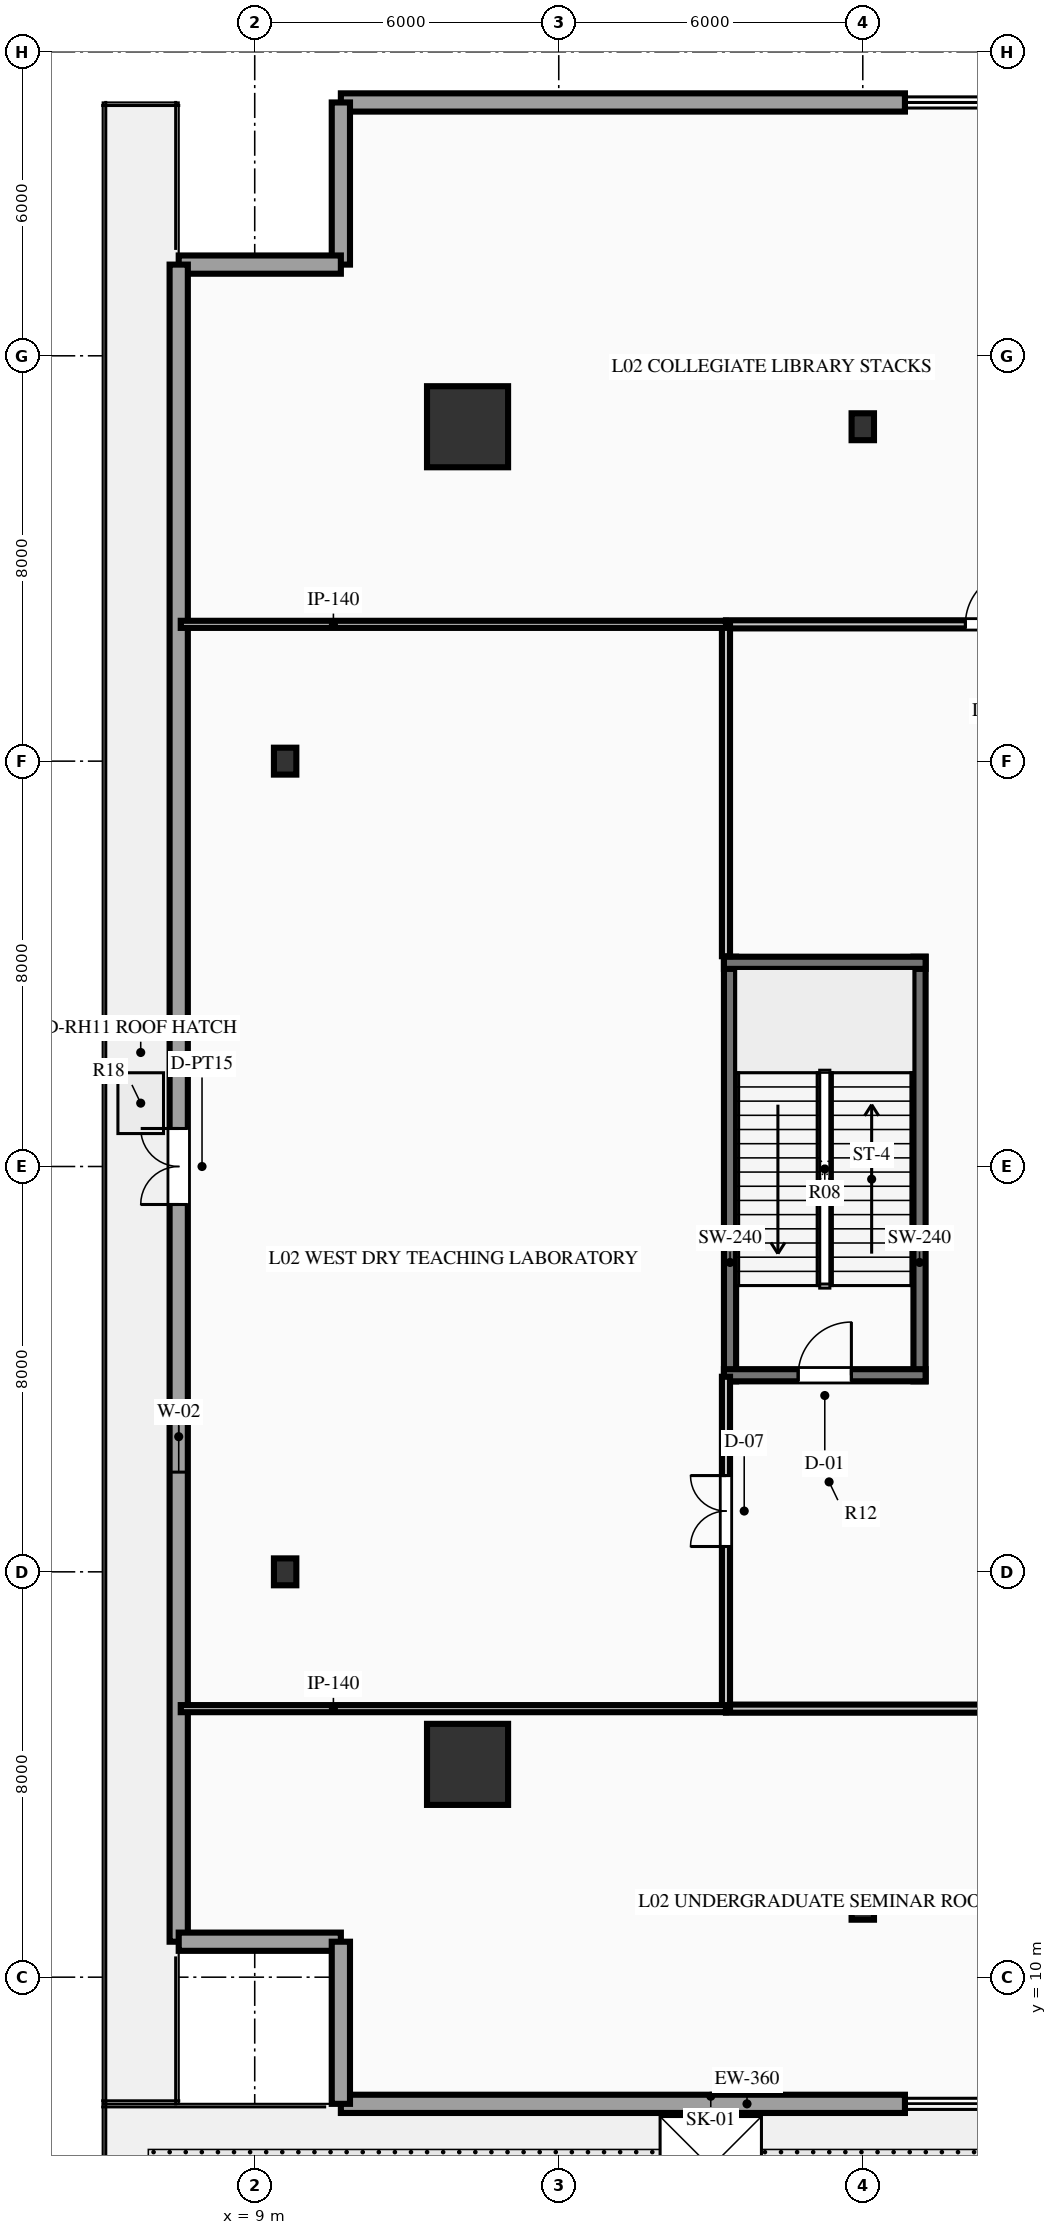
"""IFC4 building model, lengths in metres.
Left out: names, types, materials, properties, quantities, classifications, styles, units other than length and angle.
Written with IfcOpenShell. Run it as: python <this file> out.ifc"""

import sys

from ifc_helpers import new_model, si_unit, direction, frame, frame_2d, origin, origin_2d, place, context, subcontext, project, spatial, rectangle, hollow_rectangle, i_section, extrude, element, fill, save


model = new_model("IFC4")
c1 = context("Model", 3, precision=1e-05, world=origin(), true_north=direction((0.0, 1.0)))
c2 = subcontext(c1, "Body", "Model", "MODEL_VIEW")
j1 = project(units=[si_unit("LENGTHUNIT", "METRE"), si_unit("PLANEANGLEUNIT", "RADIAN")], contexts=[c1])
p1 = place(None, origin())
s1 = spatial("IfcSite", under=j1, at=p1, CompositionType="ELEMENT")
p2 = place(p1, origin())
s2 = spatial("IfcBuilding", under=s1, at=p2, CompositionType="ELEMENT")
p3 = place(p2, frame((0.0, 0.0, 11.4)))
s3 = spatial("IfcBuildingStorey", under=s2, at=p3, CompositionType="ELEMENT", Elevation=11.4)
for number, where, z_axis, x_axis in (
    (1, (18.38, 21.76, 0.0), (0.0, 0.0, 1.0), (0.0, 1.0, 0.0)),
    (2, (22.12, 21.76, 0.0), (0.0, 0.0, 1.0), (0.0, 1.0, 0.0)),
):
    element("IfcWall", number, at=place(p3, frame(where, z_axis=z_axis, x_axis=x_axis)), inside=s3, PredefinedType="SHEAR", context=c2, shape_type="SweptSolid", body=[
        extrude(rectangle(XDim=8.38, YDim=0.24, at=frame_2d((4.19, 0.0))), origin(), (0.0, 0.0, 1.0), 5.4),
    ])
p4 = place(p3, frame((18.26, 21.88, 0.0), z_axis=(0.0, 0.0, 1.0), x_axis=(1.0, 0.0, 0.0)))
e3 = element("IfcWall", 3, at=p4, inside=s3, PredefinedType="SHEAR", context=c2, shape_type="SweptSolid", body=[
    extrude(rectangle(XDim=3.98, YDim=0.24, at=frame_2d((1.99, 0.0))), origin(), (0.0, 0.0, 1.0), 5.4),
])
p5 = place(p4, frame((1.465, 0.0, 0.0)))
e4 = element("IfcOpeningElement", 4, at=p5, cuts=e3, PredefinedType="OPENING", context=c2, shape_type="SweptSolid", body=[
    extrude(rectangle(XDim=1.05, YDim=2.15, at=frame_2d((0.525, 1.075))), frame((0.0, 0.13, 0.0), z_axis=(0.0, -1.0, 0.0), x_axis=(1.0, 0.0, 0.0)), (0.0, 0.0, 1.0), 0.26),
])
p6 = place(p3, frame((18.26, 30.02, 0.0), z_axis=(0.0, 0.0, 1.0), x_axis=(1.0, 0.0, 0.0)))
e5 = element("IfcWall", 5, at=p6, inside=s3, PredefinedType="SHEAR", context=c2, shape_type="SweptSolid", body=[
    extrude(rectangle(XDim=3.98, YDim=0.24, at=frame_2d((1.99, 0.0))), origin(), (0.0, 0.0, 1.0), 5.4),
])
for number, where, z_axis, x_axis in (
    (6, (13.2, 14.2, 0.0), (0.0, 0.0, 1.0), (1.0, 0.0, 0.0)),
    (7, (13.2, 40.6, 0.0), (0.0, 0.0, 1.0), (1.0, 0.0, 0.0)),
):
    element("IfcColumn", number, at=place(p3, frame(where, z_axis=z_axis, x_axis=x_axis)), inside=s3, PredefinedType="COLUMN", context=c2, shape_type="SweptSolid", body=[
        extrude(hollow_rectangle(XDim=1.6, YDim=1.6, WallThickness=0.08, at=origin_2d()), origin(), (0.0, 0.0, 1.0), 5.4),
    ])
for number, where, z_axis, x_axis in (
    (8, (9.6, 18.0, 0.0), (0.0, 0.0, 1.0), (1.0, 0.0, 0.0)),
    (9, (9.6, 34.0, 0.0), (0.0, 0.0, 1.0), (1.0, 0.0, 0.0)),
    (10, (21.0, 11.4, 0.0), (0.0, 0.0, 1.0), (1.0, 0.0, 0.0)),
    (11, (21.0, 40.6, 0.0), (0.0, 0.0, 1.0), (1.0, 0.0, 0.0)),
):
    element("IfcColumn", number, at=place(p3, frame(where, z_axis=z_axis, x_axis=x_axis)), inside=s3, PredefinedType="COLUMN", context=c2, shape_type="SweptSolid", body=[
        extrude(i_section(OverallWidth=0.442, OverallDepth=0.531, WebThickness=0.066, FlangeThickness=0.106, at=origin_2d()), origin(), (0.0, 0.0, 1.0), 5.4),
    ])
for number, where, z_axis, x_axis in (
    (12, (21.832, 7.5, 0.0), (0.0, 0.0, 1.0), (-1.0, 0.0, 0.0)),
    (13, (10.7, 47.0, 0.0), (0.0, 0.0, 1.0), (1.0, 0.0, 0.0)),
):
    element("IfcWall", number, at=place(p3, frame(where, z_axis=z_axis, x_axis=x_axis)), inside=s3, PredefinedType="STANDARD", context=c2, shape_type="SweptSolid", body=[
        extrude(rectangle(XDim=11.132, YDim=0.36, at=frame_2d((5.566, 0.0))), origin(), (0.0, 0.0, 1.0), 5.07),
    ])
for number, where, z_axis, x_axis in (
    (14, (10.7, 43.8, 0.0), (0.0, 0.0, 1.0), (0.0, 1.0, 0.0)),
    (15, (7.5, 43.8, 0.0), (0.0, 0.0, 1.0), (1.0, 0.0, 0.0)),
):
    element("IfcWall", number, at=place(p3, frame(where, z_axis=z_axis, x_axis=x_axis)), inside=s3, PredefinedType="STANDARD", context=c2, shape_type="SweptSolid", body=[
        extrude(rectangle(XDim=3.2, YDim=0.36, at=frame_2d((1.6, 0.0))), origin(), (0.0, 0.0, 1.0), 5.07),
    ])
p7 = place(p3, frame((7.5, 10.7, 0.0), z_axis=(0.0, 0.0, 1.0), x_axis=(0.0, 1.0, 0.0)))
e16 = element("IfcWall", 16, at=p7, inside=s3, PredefinedType="STANDARD", context=c2, shape_type="SweptSolid", body=[
    extrude(rectangle(XDim=33.1, YDim=0.36, at=frame_2d((16.55, 0.0))), origin(), (0.0, 0.0, 1.0), 5.07),
])
p8 = place(p7, frame((14.55, 0.0, 0.0)))
e17 = element("IfcOpeningElement", 17, at=p8, cuts=e16, PredefinedType="OPENING", context=c2, shape_type="SweptSolid", body=[
    extrude(rectangle(XDim=1.5, YDim=2.25, at=frame_2d((0.75, 1.125))), frame((0.0, 0.19, 0.0), z_axis=(0.0, -1.0, 0.0), x_axis=(1.0, 0.0, 0.0)), (0.0, 0.0, 1.0), 0.38),
])
p9 = place(p7, frame((9.268, 0.0, 1.0)))
e18 = element("IfcOpeningElement", 18, at=p9, cuts=e16, PredefinedType="OPENING", context=c2, shape_type="SweptSolid", body=[
    extrude(rectangle(XDim=1.4, YDim=2.2, at=frame_2d((0.7, 1.1))), frame((0.0, 0.19, 0.0), z_axis=(0.0, -1.0, 0.0), x_axis=(1.0, 0.0, 0.0)), (0.0, 0.0, 1.0), 0.38),
])
for number, where, z_axis, x_axis in (
    (19, (10.7, 10.7, 0.0), (0.0, 0.0, 1.0), (-1.0, 0.0, 0.0)),
    (20, (10.7, 7.5, 0.0), (0.0, 0.0, 1.0), (0.0, 1.0, 0.0)),
):
    element("IfcWall", number, at=place(p3, frame(where, z_axis=z_axis, x_axis=x_axis)), inside=s3, PredefinedType="STANDARD", context=c2, shape_type="SweptSolid", body=[
        extrude(rectangle(XDim=3.2, YDim=0.36, at=frame_2d((1.6, 0.0))), origin(), (0.0, 0.0, 1.0), 5.07),
    ])
p10 = place(p3, frame((18.3, 15.3, 0.0), z_axis=(0.0, 0.0, 1.0), x_axis=(1.0, 0.0, 0.0)))
e21 = element("IfcWall", 21, at=p10, inside=s3, PredefinedType="PARTITIONING", context=c2, shape_type="SweptSolid", body=[
    extrude(rectangle(XDim=35.4, YDim=0.16, at=frame_2d((17.7, 0.0))), origin(), (0.0, 0.0, 1.0), 4.292),
])
p11 = place(p10, frame((5.825, 0.0, 0.0)))
e22 = element("IfcOpeningElement", 22, at=p11, cuts=e21, PredefinedType="OPENING", context=c2, shape_type="SweptSolid", body=[
    extrude(rectangle(XDim=1.05, YDim=2.15, at=frame_2d((0.525, 1.075))), frame((0.0, 0.09, 0.0), z_axis=(0.0, -1.0, 0.0), x_axis=(1.0, 0.0, 0.0)), (0.0, 0.0, 1.0), 0.18),
])
p12 = place(p10, frame((16.55, 0.0, 0.0)))
e23 = element("IfcOpeningElement", 23, at=p12, cuts=e21, PredefinedType="OPENING", context=c2, shape_type="SweptSolid", body=[
    extrude(rectangle(XDim=1.4, YDim=2.2, at=frame_2d((0.7, 1.1))), frame((0.0, 0.09, 0.0), z_axis=(0.0, -1.0, 0.0), x_axis=(1.0, 0.0, 0.0)), (0.0, 0.0, 1.0), 0.18),
])
p13 = place(p10, frame((28.075, 0.0, 0.0)))
e24 = element("IfcOpeningElement", 24, at=p13, cuts=e21, PredefinedType="OPENING", context=c2, shape_type="SweptSolid", body=[
    extrude(rectangle(XDim=1.05, YDim=2.15, at=frame_2d((0.525, 1.075))), frame((0.0, 0.09, 0.0), z_axis=(0.0, -1.0, 0.0), x_axis=(1.0, 0.0, 0.0)), (0.0, 0.0, 1.0), 0.18),
])
p14 = place(p3, frame((18.3, 36.7, 0.0), z_axis=(0.0, 0.0, 1.0), x_axis=(1.0, 0.0, 0.0)))
e25 = element("IfcWall", 25, at=p14, inside=s3, PredefinedType="PARTITIONING", context=c2, shape_type="SweptSolid", body=[
    extrude(rectangle(XDim=35.4, YDim=0.16, at=frame_2d((17.7, 0.0))), origin(), (0.0, 0.0, 1.0), 5.07),
])
p15 = place(p14, frame((4.725, 0.0, 0.0)))
e26 = element("IfcOpeningElement", 26, at=p15, cuts=e25, PredefinedType="OPENING", context=c2, shape_type="SweptSolid", body=[
    extrude(rectangle(XDim=1.05, YDim=2.15, at=frame_2d((0.525, 1.075))), frame((0.0, 0.09, 0.0), z_axis=(0.0, -1.0, 0.0), x_axis=(1.0, 0.0, 0.0)), (0.0, 0.0, 1.0), 0.18),
])
p16 = place(p14, frame((16.975, 0.0, 0.0)))
e27 = element("IfcOpeningElement", 27, at=p16, cuts=e25, PredefinedType="OPENING", context=c2, shape_type="SweptSolid", body=[
    extrude(rectangle(XDim=1.05, YDim=2.15, at=frame_2d((0.525, 1.075))), frame((0.0, 0.09, 0.0), z_axis=(0.0, -1.0, 0.0), x_axis=(1.0, 0.0, 0.0)), (0.0, 0.0, 1.0), 0.18),
])
p17 = place(p14, frame((27.225, 0.0, 0.0)))
e28 = element("IfcOpeningElement", 28, at=p17, cuts=e25, PredefinedType="OPENING", context=c2, shape_type="SweptSolid", body=[
    extrude(rectangle(XDim=0.95, YDim=2.15, at=frame_2d((0.475, 1.075))), frame((0.0, 0.09, 0.0), z_axis=(0.0, -1.0, 0.0), x_axis=(1.0, 0.0, 0.0)), (0.0, 0.0, 1.0), 0.18),
])
p18 = place(p14, frame((30.275, 0.0, 0.0)))
e29 = element("IfcOpeningElement", 29, at=p18, cuts=e25, PredefinedType="OPENING", context=c2, shape_type="SweptSolid", body=[
    extrude(rectangle(XDim=0.95, YDim=2.15, at=frame_2d((0.475, 1.075))), frame((0.0, 0.09, 0.0), z_axis=(0.0, -1.0, 0.0), x_axis=(1.0, 0.0, 0.0)), (0.0, 0.0, 1.0), 0.18),
])
p19 = place(p14, frame((33.3, 0.0, 0.0)))
e30 = element("IfcOpeningElement", 30, at=p19, cuts=e25, PredefinedType="OPENING", context=c2, shape_type="SweptSolid", body=[
    extrude(rectangle(XDim=1.0, YDim=2.15, at=frame_2d((0.5, 1.075))), frame((0.0, 0.09, 0.0), z_axis=(0.0, -1.0, 0.0), x_axis=(1.0, 0.0, 0.0)), (0.0, 0.0, 1.0), 0.18),
])
p20 = place(p3, frame((18.3, 15.3, 0.0), z_axis=(0.0, 0.0, 1.0), x_axis=(0.0, 1.0, 0.0)))
e31 = element("IfcWall", 31, at=p20, inside=s3, PredefinedType="PARTITIONING", context=c2, shape_type="SweptSolid", body=[
    extrude(rectangle(XDim=6.55, YDim=0.16, at=frame_2d((3.275, 0.0))), origin(), (0.0, 0.0, 1.0), 5.07),
])
p21 = place(p20, frame((3.2, 0.0, 0.0)))
e32 = element("IfcOpeningElement", 32, at=p21, cuts=e31, PredefinedType="OPENING", context=c2, shape_type="SweptSolid", body=[
    extrude(rectangle(XDim=1.4, YDim=2.2, at=frame_2d((0.7, 1.1))), frame((0.0, 0.09, 0.0), z_axis=(0.0, -1.0, 0.0), x_axis=(1.0, 0.0, 0.0)), (0.0, 0.0, 1.0), 0.18),
])
p22 = place(p3, frame((18.3, 30.15, 0.0), z_axis=(0.0, 0.0, 1.0), x_axis=(0.0, 1.0, 0.0)))
e33 = element("IfcWall", 33, at=p22, inside=s3, PredefinedType="PARTITIONING", context=c2, shape_type="SweptSolid", body=[
    extrude(rectangle(XDim=6.55, YDim=0.16, at=frame_2d((3.275, 0.0))), origin(), (0.0, 0.0, 1.0), 5.07),
])
p23 = place(p3, frame((7.54, 15.3, 0.0), z_axis=(0.0, 0.0, 1.0), x_axis=(1.0, 0.0, 0.0)))
e34 = element("IfcWall", 34, at=p23, inside=s3, PredefinedType="PARTITIONING", context=c2, shape_type="SweptSolid", body=[
    extrude(rectangle(XDim=10.76, YDim=0.14, at=frame_2d((5.38, 0.0))), origin(), (0.0, 0.0, 1.0), 4.292),
])
p24 = place(p3, frame((7.54, 36.7, 0.0), z_axis=(0.0, 0.0, 1.0), x_axis=(1.0, 0.0, 0.0)))
e35 = element("IfcWall", 35, at=p24, inside=s3, PredefinedType="PARTITIONING", context=c2, shape_type="SweptSolid", body=[
    extrude(rectangle(XDim=10.76, YDim=0.14, at=frame_2d((5.38, 0.0))), origin(), (0.0, 0.0, 1.0), 5.07),
])
p25 = place(p8, origin())
e36 = element("IfcDoor", 36, at=p25, inside=s3, OperationType="DOUBLE_DOOR_SINGLE_SWING", PredefinedType="DOOR", context=c2, shape_type="SweptSolid", body=[
    extrude(rectangle(XDim=1.5, YDim=2.25, at=frame_2d((0.75, 1.125))), frame((0.0, 0.025, 0.0), z_axis=(0.0, -1.0, 0.0), x_axis=(1.0, 0.0, 0.0)), (0.0, 0.0, 1.0), 0.05),
])
fill(e17, e36)
p26 = place(p9, origin())
e37 = element("IfcWindow", 37, at=p26, inside=s3, PartitioningType="SINGLE_PANEL", PredefinedType="WINDOW", context=c2, shape_type="SweptSolid", body=[
    extrude(rectangle(XDim=1.4, YDim=2.2, at=frame_2d((0.7, 1.1))), frame((0.0, 0.03, 0.0), z_axis=(0.0, -1.0, 0.0), x_axis=(1.0, 0.0, 0.0)), (0.0, 0.0, 1.0), 0.06),
])
fill(e18, e37)
p27 = place(p3, frame((0.0, 0.0, -0.25)))
p28 = place(p27, frame((18.0, 6.25, 0.2)))
e38 = element("IfcWindow", 38, at=p28, inside=s3, PartitioningType="SINGLE_PANEL", PredefinedType="SKYLIGHT", context=c2, shape_type="SweptSolid", body=[
    extrude(rectangle(XDim=2.0, YDim=2.0, at=origin_2d()), origin(), (0.0, 0.0, 1.0), 0.05),
])
p29 = place(p3, frame((0.0, 0.0, -0.25)))
p30 = place(p29, frame((6.75, 27.25, 0.2)))
e39 = element("IfcDoor", 39, at=p30, inside=s3, OperationType="SINGLE_SWING_LEFT", PredefinedType="TRAPDOOR", context=c2, shape_type="SweptSolid", body=[
    extrude(rectangle(XDim=0.9, YDim=1.2, at=origin_2d()), origin(), (0.0, 0.0, 1.0), 0.05),
])
p31 = place(p5, origin())
e40 = element("IfcDoor", 40, at=p31, inside=s3, OperationType="SINGLE_SWING_RIGHT", PredefinedType="DOOR", context=c2, shape_type="SweptSolid", body=[
    extrude(rectangle(XDim=1.05, YDim=2.15, at=frame_2d((0.525, 1.075))), frame((0.0, 0.025, 0.0), z_axis=(0.0, -1.0, 0.0), x_axis=(1.0, 0.0, 0.0)), (0.0, 0.0, 1.0), 0.05),
])
fill(e4, e40)
p32 = place(p15, origin())
e41 = element("IfcDoor", 41, at=p32, inside=s3, OperationType="SINGLE_SWING_RIGHT", PredefinedType="DOOR", context=c2, shape_type="SweptSolid", body=[
    extrude(rectangle(XDim=1.05, YDim=2.15, at=frame_2d((0.525, 1.075))), frame((0.0, 0.025, 0.0), z_axis=(0.0, -1.0, 0.0), x_axis=(1.0, 0.0, 0.0)), (0.0, 0.0, 1.0), 0.05),
])
fill(e26, e41)
p33 = place(p21, origin())
e42 = element("IfcDoor", 42, at=p33, inside=s3, OperationType="DOUBLE_DOOR_SINGLE_SWING", PredefinedType="DOOR", context=c2, shape_type="SweptSolid", body=[
    extrude(rectangle(XDim=1.4, YDim=2.2, at=frame_2d((0.7, 1.1))), frame((0.0, 0.025, 0.0), z_axis=(0.0, -1.0, 0.0), x_axis=(1.0, 0.0, 0.0)), (0.0, 0.0, 1.0), 0.05),
])
fill(e32, e42)
save(model, sys.argv[1])
